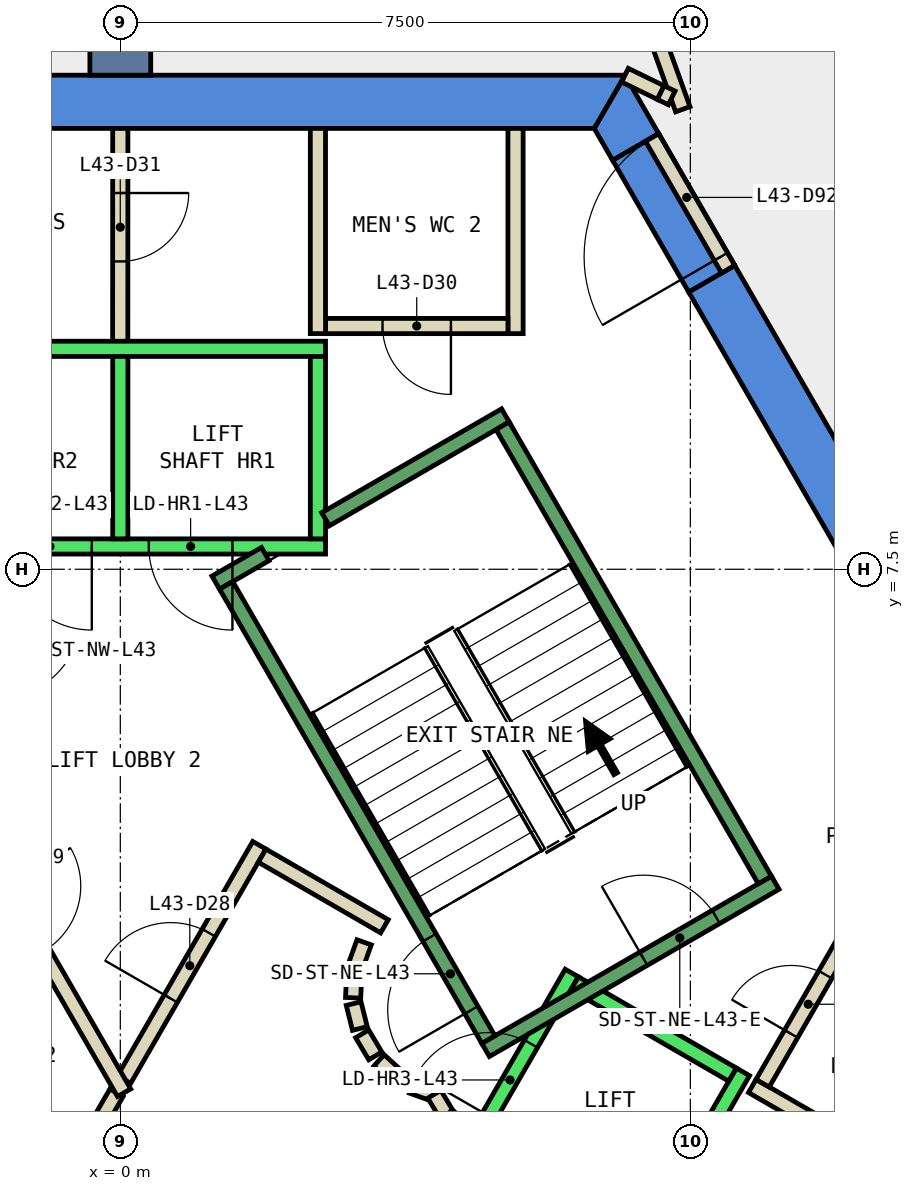
"""IFC4 building model, lengths in metres.
Left out: names, types, materials, properties, quantities, classifications, styles, units other than length and angle.
Written with IfcOpenShell. Run it as: python <this file> out.ifc"""

import sys

from ifc_helpers import new_model, si_unit, direction, frame, frame_2d, origin, place, context, subcontext, project, spatial, polyline, rectangle, outline, extrude, element, fill, save


model = new_model("IFC4")
c1 = context("Model", 3, precision=1e-05, world=origin(), true_north=direction((0.0, 1.0)))
c2 = subcontext(c1, "Body", "Model", "MODEL_VIEW")
j1 = project(units=[si_unit("LENGTHUNIT", "METRE"), si_unit("PLANEANGLEUNIT", "RADIAN")], contexts=[c1])
p1 = place(None, origin())
s1 = spatial("IfcSite", under=j1, at=p1, CompositionType="ELEMENT")
p2 = place(p1, origin())
s2 = spatial("IfcBuilding", under=s1, at=p2, CompositionType="ELEMENT")
p3 = place(p2, frame((0.0, 0.0, 194.0)))
s3 = spatial("IfcBuildingStorey", under=s2, at=p3, CompositionType="ELEMENT", Elevation=194.0)
p4 = place(p3, frame((0.0, 0.0, -0.4)))
e1 = element("IfcWall", 1, at=p4, inside=s3, PredefinedType="SHEAR", context=c2, shape_type="SweptSolid", body=[
    extrude(outline(polyline([(8.084, 11.498), (7.478, 11.148), (12.471, 2.5), (13.279, 2.5), (8.084, 11.498)])), origin(), (0.0, 0.0, 1.0), 4.2),
])
p5 = place(p3, frame((0.0, 0.0, -0.4)))
e2 = element("IfcWall", 2, at=p5, inside=s3, PredefinedType="SHEAR", context=c2, shape_type="SweptSolid", body=[
    extrude(outline(polyline([(6.478, 12.88), (7.084, 13.23), (6.64, 14.0), (6.235, 13.3), (6.478, 12.88)])), origin(), (0.0, 0.0, 1.0), 4.2),
])
p6 = place(p3, frame((0.0, 0.0, 3.6)))
e3 = element("IfcWall", 3, at=p6, inside=s3, PredefinedType="SHEAR", context=c2, shape_type="SweptSolid", body=[
    extrude(outline(polyline([(7.084, 13.23), (6.478, 12.88), (7.478, 11.148), (8.084, 11.498), (7.084, 13.23)])), origin(), (0.0, 0.0, 1.0), 0.2),
])
p7 = place(p3, frame((0.0, 0.0, -0.4)))
e4 = element("IfcWall", 4, at=p7, inside=s3, PredefinedType="SHEAR", context=c2, shape_type="SweptSolid", body=[
    extrude(outline(polyline([(6.64, 14.0), (-6.64, 14.0), (-6.235, 13.3), (6.235, 13.3), (6.64, 14.0)])), origin(), (0.0, 0.0, 1.0), 4.2),
])
p8 = place(p3, frame((0.0, 0.0, -0.4)))
e5 = element("IfcWall", 5, at=p8, inside=s3, PredefinedType="SHEAR", context=c2, shape_type="SweptSolid", body=[
    extrude(outline(polyline([(6.64, -9.0), (13.279, 2.5), (12.471, 2.5), (6.235, -8.3), (6.64, -9.0)])), origin(), (0.0, 0.0, 1.0), 4.2),
])
p9 = place(p3, frame((0.0, 14.0, -0.4), z_axis=(0.0, 0.0, 1.0), x_axis=(0.0, 1.0, 0.0)))
e6 = element("IfcWall", 6, at=p9, inside=s3, PredefinedType="SHEAR", context=c2, shape_type="SweptSolid", body=[
    extrude(rectangle(XDim=9.0, YDim=0.8, at=frame_2d((4.5, 0.0))), origin(), (0.0, 0.0, 1.0), 4.2),
])
p10 = place(p3, frame((6.64, 14.0, 0.0), z_axis=(0.0, 0.0, 1.0), x_axis=(0.899046412443, -0.437853341055, 0.0)))
e7 = element("IfcWall", 7, at=p10, inside=s3, PredefinedType="PARTITIONING", context=c2, shape_type="SweptSolid", body=[
    extrude(rectangle(XDim=0.523, YDim=0.2, at=frame_2d((0.261, 0.0))), origin(), (0.0, 0.0, 1.0), 3.8),
])
p11 = place(p3, frame((7.401, 13.552, 0.0), z_axis=(0.0, 0.0, 1.0), x_axis=(-0.337944878606, 0.941165904091, 0.0)))
e8 = element("IfcWall", 8, at=p11, inside=s3, PredefinedType="PARTITIONING", context=c2, shape_type="SweptSolid", body=[
    extrude(rectangle(XDim=1.038, YDim=0.2, at=frame_2d((0.519, 0.0))), origin(), (0.0, 0.0, 1.0), 3.8),
])
p12 = place(p3, frame((5.2, 13.3, 0.0), z_axis=(0.0, 0.0, 1.0), x_axis=(0.0, -1.0, 0.0)))
e9 = element("IfcWall", 9, at=p12, inside=s3, PredefinedType="PARTITIONING", context=c2, shape_type="SweptSolid", body=[
    extrude(rectangle(XDim=2.7, YDim=0.2, at=frame_2d((1.35, 0.0))), origin(), (0.0, 0.0, 1.0), 3.8),
])
p13 = place(p3, frame((5.1, 10.7, 0.0), z_axis=(0.0, 0.0, 1.0), x_axis=(-1.0, 0.0, 0.0)))
e10 = element("IfcWall", 10, at=p13, inside=s3, PredefinedType="PARTITIONING", context=c2, shape_type="SweptSolid", body=[
    extrude(rectangle(XDim=2.4, YDim=0.2, at=frame_2d((1.2, 0.0))), origin(), (0.0, 0.0, 1.0), 3.8),
])
p14 = place(p13, frame((0.75, 0.0, 0.0)))
e11 = element("IfcOpeningElement", 11, at=p14, cuts=e10, PredefinedType="OPENING", context=c2, shape_type="SweptSolid", body=[
    extrude(rectangle(XDim=0.9, YDim=2.1, at=frame_2d((0.45, 1.05))), frame((0.0, 0.11, 0.0), z_axis=(0.0, -1.0, 0.0), x_axis=(1.0, 0.0, 0.0)), (0.0, 0.0, 1.0), 0.22),
])
p15 = place(p3, frame((2.6, 10.6, 0.0), z_axis=(0.0, 0.0, 1.0), x_axis=(0.0, 1.0, 0.0)))
e12 = element("IfcWall", 12, at=p15, inside=s3, PredefinedType="PARTITIONING", context=c2, shape_type="SweptSolid", body=[
    extrude(rectangle(XDim=2.7, YDim=0.2, at=frame_2d((1.35, 0.0))), origin(), (0.0, 0.0, 1.0), 3.8),
])
p16 = place(p3, frame((0.0, 13.3, 0.0), z_axis=(0.0, 0.0, 1.0), x_axis=(-0.000336728662, -0.999999943307, 0.0)))
e13 = element("IfcWall", 13, at=p16, inside=s3, PredefinedType="PARTITIONING", context=c2, shape_type="SweptSolid", body=[
    extrude(rectangle(XDim=2.9, YDim=0.2, at=frame_2d((1.45, 0.0))), origin(), (0.0, 0.0, 1.0), 3.8),
])
p17 = place(p16, frame((0.85, 0.0, 0.0)))
e14 = element("IfcOpeningElement", 14, at=p17, cuts=e13, PredefinedType="OPENING", context=c2, shape_type="SweptSolid", body=[
    extrude(rectangle(XDim=0.9, YDim=2.1, at=frame_2d((0.45, 1.05))), frame((0.0, 0.11, 0.0), z_axis=(0.0, -1.0, 0.0), x_axis=(1.0, 0.0, 0.0)), (0.0, 0.0, 1.0), 0.22),
])
p18 = place(p3, frame((10.653, -0.648, 0.0), z_axis=(0.0, 0.0, 1.0), x_axis=(-0.866036505625, 0.499980770555, 0.0)))
e15 = element("IfcWall", 15, at=p18, inside=s3, PredefinedType="PARTITIONING", context=c2, shape_type="SweptSolid", body=[
    extrude(rectangle(XDim=2.7, YDim=0.2, at=frame_2d((1.35, 0.0))), origin(), (0.0, 0.0, 1.0), 3.8),
])
p19 = place(p3, frame((8.451, 0.738, 0.0), z_axis=(0.0, 0.0, 1.0), x_axis=(0.499913221443, 0.866075499611, 0.0)))
e16 = element("IfcWall", 16, at=p19, inside=s3, PredefinedType="PARTITIONING", context=c2, shape_type="SweptSolid", body=[
    extrude(rectangle(XDim=2.4, YDim=0.2, at=frame_2d((1.2, 0.0))), origin(), (0.0, 0.0, 1.0), 3.8),
])
p20 = place(p19, frame((0.75, 0.0, 0.0)))
e17 = element("IfcOpeningElement", 17, at=p20, cuts=e16, PredefinedType="OPENING", context=c2, shape_type="SweptSolid", body=[
    extrude(rectangle(XDim=0.9, YDim=2.1, at=frame_2d((0.45, 1.05))), frame((0.0, 0.11, 0.0), z_axis=(0.0, -1.0, 0.0), x_axis=(1.0, 0.0, 0.0)), (0.0, 0.0, 1.0), 0.22),
])
p21 = place(p3, frame((-0.982, -1.0, 0.0), z_axis=(0.0, 0.0, 1.0), x_axis=(0.50024047865, 0.865886518847, 0.0)))
e18 = element("IfcWall", 18, at=p21, inside=s3, PredefinedType="PARTITIONING", context=c2, shape_type="SweptSolid", body=[
    extrude(rectangle(XDim=1.863, YDim=0.2, at=frame_2d((0.931, 0.0))), origin(), (0.0, 0.0, 1.0), 3.8),
])
p22 = place(p3, frame((0.05, 0.787, 0.0), z_axis=(0.0, 0.0, 1.0), x_axis=(0.499954076797, 0.866051915934, 0.0)))
e19 = element("IfcWall", 19, at=p22, inside=s3, PredefinedType="PARTITIONING", context=c2, shape_type="SweptSolid", body=[
    extrude(rectangle(XDim=3.558, YDim=0.2, at=frame_2d((1.779, 0.0))), origin(), (0.0, 0.0, 1.0), 3.8),
])
p23 = place(p22, frame((1.229, 0.0, 0.0)))
e20 = element("IfcOpeningElement", 20, at=p23, cuts=e19, PredefinedType="OPENING", context=c2, shape_type="SweptSolid", body=[
    extrude(rectangle(XDim=1.0, YDim=2.1, at=frame_2d((0.5, 1.05))), frame((0.0, 0.11, 0.0), z_axis=(0.0, -1.0, 0.0), x_axis=(1.0, 0.0, 0.0)), (0.0, 0.0, 1.0), 0.22),
])
p24 = place(p3, frame((1.866, 3.732, 0.0), z_axis=(0.0, 0.0, 1.0), x_axis=(0.866043361281, -0.499968895414, 0.0)))
e21 = element("IfcWall", 21, at=p24, inside=s3, PredefinedType="PARTITIONING", context=c2, shape_type="SweptSolid", body=[
    extrude(rectangle(XDim=1.858, YDim=0.2, at=frame_2d((0.929, 0.0))), origin(), (0.0, 0.0, 1.0), 3.8),
])
p25 = place(p3, frame((3.208, 2.592, 0.0), z_axis=(0.0, 0.0, 1.0), x_axis=(-0.337388820924, -0.941365382578, 0.0)))
e22 = element("IfcWall", 22, at=p25, inside=s3, PredefinedType="PARTITIONING", context=c2, shape_type="SweptSolid", body=[
    extrude(rectangle(XDim=0.338, YDim=0.2, at=frame_2d((0.169, 0.0))), origin(), (0.0, 0.0, 1.0), 3.8),
])
p26 = place(p3, frame((3.079, 2.199, 0.0), z_axis=(0.0, 0.0, 1.0), x_axis=(-0.047771483479, -0.998858290933, 0.0)))
e23 = element("IfcWall", 23, at=p26, inside=s3, PredefinedType="PARTITIONING", context=c2, shape_type="SweptSolid", body=[
    extrude(rectangle(XDim=0.337, YDim=0.2, at=frame_2d((0.169, 0.0))), origin(), (0.0, 0.0, 1.0), 3.8),
])
p27 = place(p3, frame((3.07, 1.786, 0.0), z_axis=(0.0, 0.0, 1.0), x_axis=(0.242705583207, -0.970099994784, 0.0)))
e24 = element("IfcWall", 24, at=p27, inside=s3, PredefinedType="PARTITIONING", context=c2, shape_type="SweptSolid", body=[
    extrude(rectangle(XDim=0.338, YDim=0.2, at=frame_2d((0.169, 0.0))), origin(), (0.0, 0.0, 1.0), 3.8),
])
for number, where, z_axis, x_axis in (
    (25, (3.182, 1.388, 0.0), (0.0, 0.0, 1.0), (0.512, -0.859, 0.0)),
    (26, (3.404, 1.039, 0.0), (0.0, 0.0, 1.0), (0.74, -0.672, 0.0)),
):
    element("IfcWall", number, at=place(p3, frame(where, z_axis=z_axis, x_axis=x_axis)), inside=s3, PredefinedType="PARTITIONING", context=c2, shape_type="SweptSolid", body=[
        extrude(rectangle(XDim=0.338, YDim=0.2, at=frame_2d((0.169, 0.0))), origin(), (0.0, 0.0, 1.0), 3.8),
    ])
p28 = place(p3, frame((3.838, 0.702, 0.0), z_axis=(0.0, 0.0, 1.0), x_axis=(0.941035081519, -0.338308993895, 0.0)))
e27 = element("IfcWall", 27, at=p28, inside=s3, PredefinedType="PARTITIONING", context=c2, shape_type="SweptSolid", body=[
    extrude(rectangle(XDim=0.337, YDim=0.2, at=frame_2d((0.168, 0.0))), origin(), (0.0, 0.0, 1.0), 3.8),
])
p29 = place(p3, frame((4.132, 0.593, 0.0), z_axis=(0.0, 0.0, 1.0), x_axis=(0.513561617048, -0.858052717201, 0.0)))
e28 = element("IfcWall", 28, at=p29, inside=s3, PredefinedType="PARTITIONING", context=c2, shape_type="SweptSolid", body=[
    extrude(rectangle(XDim=0.308, YDim=0.2, at=frame_2d((0.154, 0.0))), origin(), (0.0, 0.0, 1.0), 3.8),
])
p30 = place(p3, frame((4.301, 0.315, 0.0), z_axis=(0.0, 0.0, 1.0), x_axis=(0.741798017506, -0.670623367639, 0.0)))
e29 = element("IfcWall", 29, at=p30, inside=s3, PredefinedType="PARTITIONING", context=c2, shape_type="SweptSolid", body=[
    extrude(rectangle(XDim=0.309, YDim=0.2, at=frame_2d((0.154, 0.0))), origin(), (0.0, 0.0, 1.0), 3.8),
])
p31 = place(p3, frame((-2.54, 5.1, 0.0), z_axis=(0.0, 0.0, 1.0), x_axis=(0.499925051871, -0.866068670783, 0.0)))
e30 = element("IfcWall", 30, at=p31, inside=s3, PredefinedType="PARTITIONING", context=c2, shape_type="SweptSolid", body=[
    extrude(rectangle(XDim=5.181, YDim=0.2, at=frame_2d((2.59, 0.0))), origin(), (0.0, 0.0, 1.0), 3.8),
])
p32 = place(p31, frame((2.04, 0.0, 0.0)))
e31 = element("IfcOpeningElement", 31, at=p32, cuts=e30, PredefinedType="OPENING", context=c2, shape_type="SweptSolid", body=[
    extrude(rectangle(XDim=1.0, YDim=2.1, at=frame_2d((0.5, 1.05))), frame((0.0, 0.11, 0.0), z_axis=(0.0, -1.0, 0.0), x_axis=(1.0, 0.0, 0.0)), (0.0, 0.0, 1.0), 0.22),
])
p33 = place(p3, frame((7.997, 11.448, 0.0), z_axis=(0.0, 0.0, 1.0), x_axis=(-0.50002537861, 0.866010750942, 0.0)))
e32 = element("IfcWall", 32, at=p33, inside=s3, PredefinedType="PARTITIONING", context=c2, shape_type="SweptSolid", body=[
    extrude(rectangle(XDim=2.0, YDim=0.2, at=frame_2d((1.0, 0.0))), origin(), (0.0, 0.0, 1.0), 2.4),
])
p34 = place(p33, frame((0.19, 0.0, 0.0)))
e33 = element("IfcOpeningElement", 33, at=p34, cuts=e32, PredefinedType="OPENING", context=c2, shape_type="SweptSolid", body=[
    extrude(rectangle(XDim=1.8, YDim=2.1, at=frame_2d((0.9, 1.05))), frame((0.0, 0.11, 0.0), z_axis=(0.0, -1.0, 0.0), x_axis=(1.0, 0.0, 0.0)), (0.0, 0.0, 1.0), 0.22),
])
p35 = place(p3, frame((7.11, 13.771, 0.0), z_axis=(0.0, 0.0, 1.0), x_axis=(0.900120852209, -0.435640277545, 0.0)))
e34 = element("IfcWall", 34, at=p35, inside=s3, PredefinedType="PARTITIONING", context=c2, shape_type="SweptSolid", body=[
    extrude(rectangle(XDim=0.161, YDim=0.2, at=frame_2d((0.081, 0.0))), origin(), (0.0, 0.0, 1.0), 2.4),
])
p36 = place(p3, frame((2.7, 7.8, 0.0), z_axis=(0.0, 0.0, 1.0), x_axis=(-1.0, 0.0, 0.0)))
e35 = element("IfcWall", 35, at=p36, inside=s3, PredefinedType="STANDARD", context=c2, shape_type="SweptSolid", body=[
    extrude(rectangle(XDim=5.4, YDim=0.2, at=frame_2d((2.7, 0.0))), origin(), (0.0, 0.0, 1.0), 3.8),
])
p37 = place(p36, frame((1.225, 0.0, 0.0)))
e36 = element("IfcOpeningElement", 36, at=p37, cuts=e35, PredefinedType="OPENING", context=c2, shape_type="SweptSolid", body=[
    extrude(rectangle(XDim=1.1, YDim=2.1, at=frame_2d((0.55, 1.05))), frame((0.0, 0.11, 0.0), z_axis=(0.0, -1.0, 0.0), x_axis=(1.0, 0.0, 0.0)), (0.0, 0.0, 1.0), 0.22),
])
p38 = place(p36, frame((3.075, 0.0, 0.0)))
e37 = element("IfcOpeningElement", 37, at=p38, cuts=e35, PredefinedType="OPENING", context=c2, shape_type="SweptSolid", body=[
    extrude(rectangle(XDim=1.1, YDim=2.1, at=frame_2d((0.55, 1.05))), frame((0.0, 0.11, 0.0), z_axis=(0.0, -1.0, 0.0), x_axis=(1.0, 0.0, 0.0)), (0.0, 0.0, 1.0), 0.22),
])
p39 = place(p3, frame((2.7, 10.4, 0.0), z_axis=(0.0, 0.0, 1.0), x_axis=(-1.0, 0.0, 0.0)))
e38 = element("IfcWall", 38, at=p39, inside=s3, PredefinedType="STANDARD", context=c2, shape_type="SweptSolid", body=[
    extrude(rectangle(XDim=5.4, YDim=0.2, at=frame_2d((2.7, 0.0))), origin(), (0.0, 0.0, 1.0), 3.8),
])
for number, where, z_axis, x_axis in (
    (39, (2.6, 7.9, 0.0), (0.0, 0.0, 1.0), (0.0, 1.0, 0.0)),
    (40, (0.0, 7.9, 0.0), (0.0, 0.0, 1.0), (0.0, 1.0, 0.0)),
):
    element("IfcWall", number, at=place(p3, frame(where, z_axis=z_axis, x_axis=x_axis)), inside=s3, PredefinedType="STANDARD", context=c2, shape_type="SweptSolid", body=[
        extrude(rectangle(XDim=2.4, YDim=0.2, at=frame_2d((1.2, 0.0))), origin(), (0.0, 0.0, 1.0), 3.8),
    ])
p40 = place(p3, frame((3.24, -2.488, 0.0), z_axis=(0.0, 0.0, 1.0), x_axis=(0.500034260056, 0.866005622828, 0.0)))
e41 = element("IfcWall", 41, at=p40, inside=s3, PredefinedType="STANDARD", context=c2, shape_type="SweptSolid", body=[
    extrude(rectangle(XDim=5.399, YDim=0.2, at=frame_2d((2.7, 0.0))), origin(), (0.0, 0.0, 1.0), 3.8),
])
p41 = place(p40, frame((3.225, 0.0, 0.0)))
e42 = element("IfcOpeningElement", 42, at=p41, cuts=e41, PredefinedType="OPENING", context=c2, shape_type="SweptSolid", body=[
    extrude(rectangle(XDim=1.1, YDim=2.1, at=frame_2d((0.55, 1.05))), frame((0.0, 0.11, 0.0), z_axis=(0.0, -1.0, 0.0), x_axis=(1.0, 0.0, 0.0)), (0.0, 0.0, 1.0), 0.22),
])
p42 = place(p40, frame((1.225, 0.0, 0.0)))
e43 = element("IfcOpeningElement", 43, at=p42, cuts=e41, PredefinedType="OPENING", context=c2, shape_type="SweptSolid", body=[
    extrude(rectangle(XDim=1.1, YDim=2.1, at=frame_2d((0.55, 1.05))), frame((0.0, 0.11, 0.0), z_axis=(0.0, -1.0, 0.0), x_axis=(1.0, 0.0, 0.0)), (0.0, 0.0, 1.0), 0.22),
])
p43 = place(p3, frame((5.492, -3.788, 0.0), z_axis=(0.0, 0.0, 1.0), x_axis=(0.500034260056, 0.866005622828, 0.0)))
e44 = element("IfcWall", 44, at=p43, inside=s3, PredefinedType="STANDARD", context=c2, shape_type="SweptSolid", body=[
    extrude(rectangle(XDim=5.399, YDim=0.2, at=frame_2d((2.7, 0.0))), origin(), (0.0, 0.0, 1.0), 3.8),
])
p44 = place(p3, frame((5.977, 2.052, 0.0), z_axis=(0.0, 0.0, 1.0), x_axis=(0.865973769406, -0.500089422704, 0.0)))
e45 = element("IfcWall", 45, at=p44, inside=s3, PredefinedType="STANDARD", context=c2, shape_type="SweptSolid", body=[
    extrude(rectangle(XDim=2.399, YDim=0.2, at=frame_2d((1.2, 0.0))), origin(), (0.0, 0.0, 1.0), 3.8),
])
p45 = place(p3, frame((4.806, 1.176, 0.0), z_axis=(0.0, 0.0, 1.0), x_axis=(0.866059941101, 0.499940174841, 0.0)))
e46 = element("IfcWall", 46, at=p45, inside=s3, PredefinedType="STANDARD", context=c2, shape_type="SweptSolid", body=[
    extrude(rectangle(XDim=4.4, YDim=0.2, at=frame_2d((2.2, 0.0))), origin(), (0.0, 0.0, 1.0), 3.8),
])
p46 = place(p45, frame((2.4, 0.0, 0.0)))
e47 = element("IfcOpeningElement", 47, at=p46, cuts=e46, PredefinedType="OPENING", context=c2, shape_type="SweptSolid", body=[
    extrude(rectangle(XDim=1.1, YDim=2.2, at=frame_2d((0.55, 1.1))), frame((0.0, 0.11, 0.0), z_axis=(0.0, -1.0, 0.0), x_axis=(1.0, 0.0, 0.0)), (0.0, 0.0, 1.0), 0.22),
])
p47 = place(p3, frame((2.7, 8.158, 0.0), z_axis=(0.0, 0.0, 1.0), x_axis=(0.86611865017, 0.499838457731, 0.0)))
e48 = element("IfcWall", 48, at=p47, inside=s3, PredefinedType="STANDARD", context=c2, shape_type="SweptSolid", body=[
    extrude(rectangle(XDim=2.733, YDim=0.2, at=frame_2d((1.366, 0.0))), origin(), (0.0, 0.0, 1.0), 3.8),
])
p48 = place(p3, frame((1.256, 7.324, 0.0), z_axis=(0.0, 0.0, 1.0), x_axis=(0.865915093549, 0.500191014278, 0.0)))
e49 = element("IfcWall", 49, at=p48, inside=s3, PredefinedType="STANDARD", context=c2, shape_type="SweptSolid", body=[
    extrude(rectangle(XDim=0.752, YDim=0.2, at=frame_2d((0.376, 0.0))), origin(), (0.0, 0.0, 1.0), 3.8),
])
p49 = place(p3, frame((4.843, 1.312, 0.0), z_axis=(0.0, 0.0, 1.0), x_axis=(-0.499963383562, 0.866046543262, 0.0)))
e50 = element("IfcWall", 50, at=p49, inside=s3, PredefinedType="STANDARD", context=c2, shape_type="SweptSolid", body=[
    extrude(rectangle(XDim=6.9, YDim=0.2, at=frame_2d((3.45, 0.0))), origin(), (0.0, 0.0, 1.0), 3.8),
])
p50 = place(p49, frame((0.45, 0.0, 0.0)))
e51 = element("IfcOpeningElement", 51, at=p50, cuts=e50, PredefinedType="OPENING", context=c2, shape_type="SweptSolid", body=[
    extrude(rectangle(XDim=1.1, YDim=2.2, at=frame_2d((0.55, 1.1))), frame((0.0, 0.11, 0.0), z_axis=(0.0, -1.0, 0.0), x_axis=(1.0, 0.0, 0.0)), (0.0, 0.0, 1.0), 0.22),
])
p51 = place(p3, frame((8.48, 3.412, 0.0), z_axis=(0.0, 0.0, 1.0), x_axis=(-0.499978703459, 0.866037698999, 0.0)))
e52 = element("IfcWall", 52, at=p51, inside=s3, PredefinedType="STANDARD", context=c2, shape_type="SweptSolid", body=[
    extrude(rectangle(XDim=6.9, YDim=0.2, at=frame_2d((3.45, 0.0))), origin(), (0.0, 0.0, 1.0), 3.8),
])
p52 = place(p23, origin())
e53 = element("IfcDoor", 53, at=p52, inside=s3, OperationType="SINGLE_SWING_RIGHT", PredefinedType="DOOR", context=c2, shape_type="SweptSolid", body=[
    extrude(rectangle(XDim=1.0, YDim=2.1, at=frame_2d((0.5, 1.05))), frame((0.0, 0.025, 0.0), z_axis=(0.0, -1.0, 0.0), x_axis=(1.0, 0.0, 0.0)), (0.0, 0.0, 1.0), 0.05),
])
fill(e20, e53)
p53 = place(p14, origin())
e54 = element("IfcDoor", 54, at=p53, inside=s3, OperationType="SINGLE_SWING_RIGHT", PredefinedType="DOOR", context=c2, shape_type="SweptSolid", body=[
    extrude(rectangle(XDim=0.9, YDim=2.1, at=frame_2d((0.45, 1.05))), frame((0.0, 0.025, 0.0), z_axis=(0.0, -1.0, 0.0), x_axis=(1.0, 0.0, 0.0)), (0.0, 0.0, 1.0), 0.05),
])
fill(e11, e54)
p54 = place(p17, origin())
e55 = element("IfcDoor", 55, at=p54, inside=s3, OperationType="SINGLE_SWING_RIGHT", PredefinedType="DOOR", context=c2, shape_type="SweptSolid", body=[
    extrude(rectangle(XDim=0.9, YDim=2.1, at=frame_2d((0.45, 1.05))), frame((0.0, 0.025, 0.0), z_axis=(0.0, -1.0, 0.0), x_axis=(1.0, 0.0, 0.0)), (0.0, 0.0, 1.0), 0.05),
])
fill(e14, e55)
p55 = place(p20, origin())
e56 = element("IfcDoor", 56, at=p55, inside=s3, OperationType="SINGLE_SWING_LEFT", PredefinedType="DOOR", context=c2, shape_type="SweptSolid", body=[
    extrude(rectangle(XDim=0.9, YDim=2.1, at=frame_2d((0.45, 1.05))), frame((0.0, 0.025, 0.0), z_axis=(0.0, -1.0, 0.0), x_axis=(1.0, 0.0, 0.0)), (0.0, 0.0, 1.0), 0.05),
])
fill(e17, e56)
p56 = place(p34, origin())
e57 = element("IfcDoor", 57, at=p56, inside=s3, OperationType="DOUBLE_DOOR_SINGLE_SWING", PredefinedType="DOOR", context=c2, shape_type="SweptSolid", body=[
    extrude(rectangle(XDim=1.8, YDim=2.1, at=frame_2d((0.9, 1.05))), frame((0.0, 0.025, 0.0), z_axis=(0.0, -1.0, 0.0), x_axis=(1.0, 0.0, 0.0)), (0.0, 0.0, 1.0), 0.05),
])
fill(e33, e57)
p57 = place(p37, origin())
e58 = element("IfcDoor", 58, at=p57, inside=s3, OperationType="SLIDING_TO_LEFT", PredefinedType="DOOR", context=c2, shape_type="SweptSolid", body=[
    extrude(rectangle(XDim=1.1, YDim=2.1, at=frame_2d((0.55, 1.05))), frame((0.0, 0.025, 0.0), z_axis=(0.0, -1.0, 0.0), x_axis=(1.0, 0.0, 0.0)), (0.0, 0.0, 1.0), 0.05),
])
fill(e36, e58)
p58 = place(p38, origin())
e59 = element("IfcDoor", 59, at=p58, inside=s3, OperationType="SLIDING_TO_LEFT", PredefinedType="DOOR", context=c2, shape_type="SweptSolid", body=[
    extrude(rectangle(XDim=1.1, YDim=2.1, at=frame_2d((0.55, 1.05))), frame((0.0, 0.025, 0.0), z_axis=(0.0, -1.0, 0.0), x_axis=(1.0, 0.0, 0.0)), (0.0, 0.0, 1.0), 0.05),
])
fill(e37, e59)
p59 = place(p41, origin())
e60 = element("IfcDoor", 60, at=p59, inside=s3, OperationType="SLIDING_TO_LEFT", PredefinedType="DOOR", context=c2, shape_type="SweptSolid", body=[
    extrude(rectangle(XDim=1.1, YDim=2.1, at=frame_2d((0.55, 1.05))), frame((0.0, 0.025, 0.0), z_axis=(0.0, -1.0, 0.0), x_axis=(1.0, 0.0, 0.0)), (0.0, 0.0, 1.0), 0.05),
])
fill(e42, e60)
p60 = place(p50, origin())
e61 = element("IfcDoor", 61, at=p60, inside=s3, OperationType="SINGLE_SWING_LEFT", PredefinedType="DOOR", context=c2, shape_type="SweptSolid", body=[
    extrude(rectangle(XDim=1.1, YDim=2.2, at=frame_2d((0.55, 1.1))), frame((0.0, 0.025, 0.0), z_axis=(0.0, -1.0, 0.0), x_axis=(1.0, 0.0, 0.0)), (0.0, 0.0, 1.0), 0.05),
])
fill(e51, e61)
p61 = place(p46, origin())
e62 = element("IfcDoor", 62, at=p61, inside=s3, OperationType="SINGLE_SWING_LEFT", PredefinedType="DOOR", context=c2, shape_type="SweptSolid", body=[
    extrude(rectangle(XDim=1.1, YDim=2.2, at=frame_2d((0.55, 1.1))), frame((0.0, 0.025, 0.0), z_axis=(0.0, -1.0, 0.0), x_axis=(1.0, 0.0, 0.0)), (0.0, 0.0, 1.0), 0.05),
])
fill(e47, e62)
save(model, sys.argv[1])
